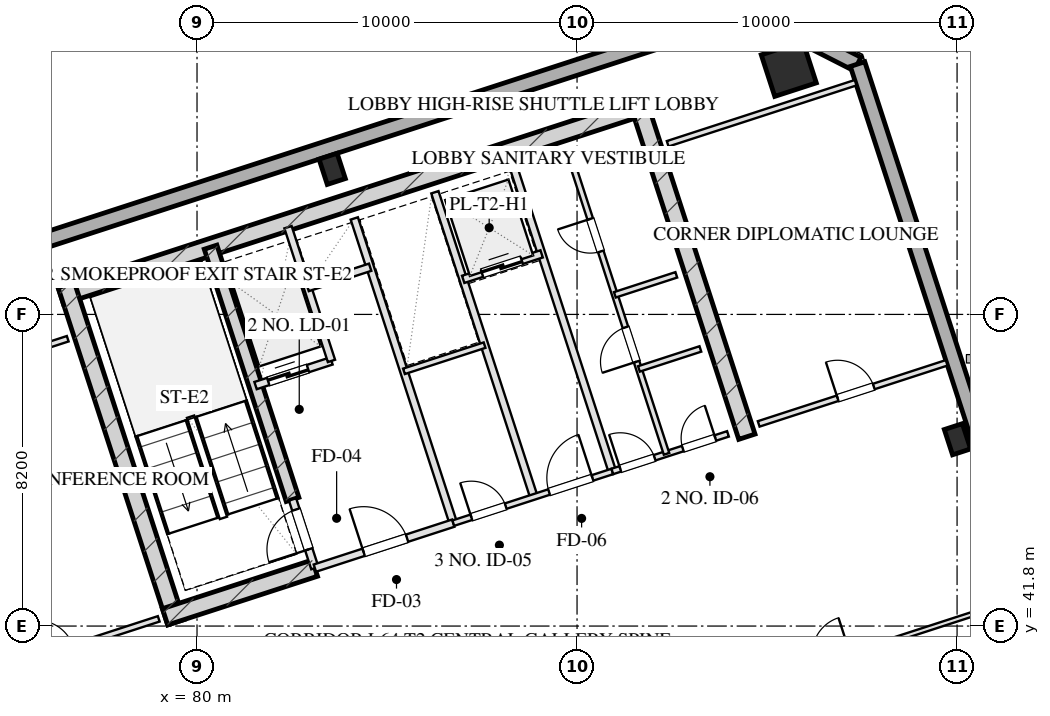
"""IFC4 building model, lengths in metres.
Left out: names, types, materials, properties, quantities, classifications, styles, units other than length and angle.
Written with IfcOpenShell. Run it as: python <this file> out.ifc"""

import sys

from ifc_helpers import new_model, si_unit, direction, frame, frame_2d, origin, origin_2d, place, context, subcontext, project, spatial, rectangle, hollow_rectangle, extrude, element, fill, save


model = new_model("IFC4")
c1 = context("Model", 3, precision=1e-05, world=origin(), true_north=direction((0.0, 1.0)))
c2 = subcontext(c1, "Body", "Model", "MODEL_VIEW")
j1 = project(units=[si_unit("LENGTHUNIT", "METRE"), si_unit("PLANEANGLEUNIT", "RADIAN")], contexts=[c1])
p1 = place(None, origin())
s1 = spatial("IfcSite", under=j1, at=p1, CompositionType="ELEMENT")
p2 = place(p1, origin())
s2 = spatial("IfcBuilding", under=s1, at=p2, CompositionType="ELEMENT")
p3 = place(p2, frame((0.0, 0.0, 237.6)))
s3 = spatial("IfcBuildingStorey", under=s2, at=p3, CompositionType="ELEMENT", Elevation=237.6)
p4 = place(p3, frame((76.415, 50.489, 0.0), z_axis=(0.0, 0.0, 1.0), x_axis=(0.951056810414, 0.309016089169, 0.0)))
e1 = element("IfcWall", 1, at=p4, inside=s3, PredefinedType="SHEAR", context=c2, shape_type="SweptSolid", body=[
    extrude(rectangle(XDim=16.25, YDim=0.45, at=frame_2d((8.125, 0.0))), origin(), (0.0, 0.0, 1.0), 3.2),
])
for number, where, z_axis, x_axis in (
    (2, (79.442, 41.899, 0.0), (0.0, 0.0, 1.0), (-0.309, 0.951, 0.0)),
    (3, (94.469, 46.781, 0.0), (0.0, 0.0, 1.0), (-0.309, 0.951, 0.0)),
):
    element("IfcWall", number, at=place(p3, frame(where, z_axis=z_axis, x_axis=x_axis)), inside=s3, PredefinedType="SHEAR", context=c2, shape_type="SweptSolid", body=[
        extrude(rectangle(XDim=9.33, YDim=0.45, at=frame_2d((4.665, 0.0))), origin(), (0.0, 0.0, 1.0), 3.2),
    ])
p5 = place(p3, frame((82.514, 45.131, 0.0), z_axis=(0.0, 0.0, 1.0), x_axis=(-0.308988790936, 0.951065679686, 0.0)))
e4 = element("IfcWall", 4, at=p5, inside=s3, PredefinedType="SHEAR", context=c2, shape_type="SweptSolid", body=[
    extrude(rectangle(XDim=6.98, YDim=0.35, at=frame_2d((3.49, 0.0))), origin(), (0.0, 0.0, 1.0), 3.2),
])
p6 = place(p3, frame((79.159, 42.043, 0.0), z_axis=(0.0, 0.0, 1.0), x_axis=(0.951047485828, 0.309044785913, 0.0)))
e5 = element("IfcWall", 5, at=p6, inside=s3, PredefinedType="SHEAR", context=c2, shape_type="SweptSolid", body=[
    extrude(rectangle(XDim=4.145, YDim=0.45, at=frame_2d((2.073, 0.0))), origin(), (0.0, 0.0, 1.0), 3.2),
])
p7 = place(p3, frame((95.572, 56.461, 0.0), z_axis=(0.0, 0.0, 1.0), x_axis=(0.951056516295, 0.309016994375, 0.0)))
e6 = element("IfcColumn", 6, at=p7, inside=s3, PredefinedType="COLUMN", context=c2, shape_type="SweptSolid", body=[
    extrude(hollow_rectangle(XDim=1.15, YDim=1.15, WallThickness=0.04, at=origin_2d()), origin(), (0.0, 0.0, 1.0), 3.201),
])
for number, where, z_axis, x_axis in (
    (7, (100.01, 46.716, 0.0), (0.0, 0.0, 1.0), (0.951, 0.309, 0.0)),
    (8, (83.557, 53.83, 0.0), (0.0, 0.0, 1.0), (0.951, 0.309, 0.0)),
):
    element("IfcColumn", number, at=place(p3, frame(where, z_axis=z_axis, x_axis=x_axis)), inside=s3, PredefinedType="COLUMN", context=c2, shape_type="SweptSolid", body=[
        extrude(hollow_rectangle(XDim=0.5, YDim=0.7, WallThickness=0.025, at=origin_2d()), origin(), (0.0, 0.0, 1.0), 3.201),
    ])
p8 = place(p3, frame((82.618, 11.414, 0.0), z_axis=(0.0, 0.0, 1.0), x_axis=(-0.309016491071, 0.951056679828, 0.0)))
e9 = element("IfcWall", 9, at=p8, inside=s3, PredefinedType="SOLIDWALL", context=c2, shape_type="SweptSolid", body=[
    extrude(rectangle(XDim=38.4, YDim=0.4, at=frame_2d((19.2, 0.0))), origin(), (0.0, 0.0, 1.0), 2.36),
])
p9 = place(p8, frame((20.825, 0.0, 0.75)))
e10 = element("IfcOpeningElement", 10, at=p9, cuts=e9, PredefinedType="OPENING", context=c2, shape_type="SweptSolid", body=[
    extrude(rectangle(XDim=1.95, YDim=1.21, at=frame_2d((0.975, 0.605))), frame((0.0, 0.21, 0.0), z_axis=(0.0, -1.0, 0.0), x_axis=(1.0, 0.0, 0.0)), (0.0, 0.0, 1.0), 0.42),
])
p10 = place(p8, frame((24.625, 0.0, 0.75)))
e11 = element("IfcOpeningElement", 11, at=p10, cuts=e9, PredefinedType="OPENING", context=c2, shape_type="SweptSolid", body=[
    extrude(rectangle(XDim=1.95, YDim=1.21, at=frame_2d((0.975, 0.605))), frame((0.0, 0.21, 0.0), z_axis=(0.0, -1.0, 0.0), x_axis=(1.0, 0.0, 0.0)), (0.0, 0.0, 1.0), 0.42),
])
p11 = place(p8, frame((15.8, 0.0, 0.0)))
e12 = element("IfcOpeningElement", 12, at=p11, cuts=e9, PredefinedType="OPENING", context=c2, shape_type="SweptSolid", body=[
    extrude(rectangle(XDim=1.1, YDim=2.15, at=frame_2d((0.55, 1.075))), frame((0.0, 0.21, 0.0), z_axis=(0.0, -1.0, 0.0), x_axis=(1.0, 0.0, 0.0)), (0.0, 0.0, 1.0), 0.42),
])
p12 = place(p3, frame((72.165, 50.706, 0.0), z_axis=(0.0, 0.0, 1.0), x_axis=(0.951058012937, 0.309012388148, 0.0)))
e13 = element("IfcWall", 13, at=p12, inside=s3, PredefinedType="SOLIDWALL", context=c2, shape_type="SweptSolid", body=[
    extrude(rectangle(XDim=23.6, YDim=0.4, at=frame_2d((11.8, 0.0))), origin(), (0.0, 0.0, 1.0), 2.36),
])
p13 = place(p3, frame((94.61, 57.999, 0.0), z_axis=(0.0, 0.0, 1.0), x_axis=(0.890979603174, -0.454043331334, 0.0)))
e14 = element("IfcWall", 14, at=p13, inside=s3, PredefinedType="SOLIDWALL", context=c2, shape_type="SweptSolid", body=[
    extrude(rectangle(XDim=3.111, YDim=0.4, at=frame_2d((1.556, 0.0))), origin(), (0.0, 0.0, 1.0), 2.36),
])
p14 = place(p3, frame((97.382, 56.586, 0.0), z_axis=(0.0, 0.0, 1.0), x_axis=(0.309016491071, -0.951056679828, 0.0)))
e15 = element("IfcWall", 15, at=p14, inside=s3, PredefinedType="SOLIDWALL", context=c2, shape_type="SweptSolid", body=[
    extrude(rectangle(XDim=38.4, YDim=0.4, at=frame_2d((19.2, 0.0))), origin(), (0.0, 0.0, 1.0), 2.36),
])
p15 = place(p14, frame((15.625, 0.0, 0.75)))
e16 = element("IfcOpeningElement", 16, at=p15, cuts=e15, PredefinedType="OPENING", context=c2, shape_type="SweptSolid", body=[
    extrude(rectangle(XDim=1.95, YDim=1.21, at=frame_2d((0.975, 0.605))), frame((0.0, 0.21, 0.0), z_axis=(0.0, -1.0, 0.0), x_axis=(1.0, 0.0, 0.0)), (0.0, 0.0, 1.0), 0.42),
])
p16 = place(p14, frame((11.825, 0.0, 0.75)))
e17 = element("IfcOpeningElement", 17, at=p16, cuts=e15, PredefinedType="OPENING", context=c2, shape_type="SweptSolid", body=[
    extrude(rectangle(XDim=1.95, YDim=1.21, at=frame_2d((0.975, 0.605))), frame((0.0, 0.21, 0.0), z_axis=(0.0, -1.0, 0.0), x_axis=(1.0, 0.0, 0.0)), (0.0, 0.0, 1.0), 0.42),
])
p17 = place(p14, frame((21.5, 0.0, 0.0)))
e18 = element("IfcOpeningElement", 18, at=p17, cuts=e15, PredefinedType="OPENING", context=c2, shape_type="SweptSolid", body=[
    extrude(rectangle(XDim=1.1, YDim=2.15, at=frame_2d((0.55, 1.075))), frame((0.0, 0.21, 0.0), z_axis=(0.0, -1.0, 0.0), x_axis=(1.0, 0.0, 0.0)), (0.0, 0.0, 1.0), 0.42),
])
p18 = place(p3, frame((83.101, 43.324, 0.0), z_axis=(0.0, 0.0, 1.0), x_axis=(-0.309048298632, 0.951046344356, 0.0)))
e19 = element("IfcWall", 19, at=p18, inside=s3, PredefinedType="PARTITIONING", context=c2, shape_type="SweptSolid", body=[
    extrude(rectangle(XDim=1.9, YDim=0.2, at=frame_2d((0.95, 0.0))), origin(), (0.0, 0.0, 1.0), 2.925),
])
p19 = place(p18, frame((0.52, 0.0, 0.0)))
e20 = element("IfcOpeningElement", 20, at=p19, cuts=e19, PredefinedType="OPENING", context=c2, shape_type="SweptSolid", body=[
    extrude(rectangle(XDim=1.1, YDim=2.05, at=frame_2d((0.55, 1.025))), frame((0.0, 0.11, 0.0), z_axis=(0.0, -1.0, 0.0), x_axis=(1.0, 0.0, 0.0)), (0.0, 0.0, 1.0), 0.22),
])
p20 = place(p3, frame((86.743, 44.508, 0.0), z_axis=(0.0, 0.0, 1.0), x_axis=(-0.309016001439, 0.951056838919, 0.0)))
e21 = element("IfcWall", 21, at=p20, inside=s3, PredefinedType="PARTITIONING", context=c2, shape_type="SweptSolid", body=[
    extrude(rectangle(XDim=8.43, YDim=0.2, at=frame_2d((4.215, 0.0))), origin(), (0.0, 0.0, 1.0), 2.925),
])
p21 = place(p3, frame((83.101, 43.324, 0.0), z_axis=(0.0, 0.0, 1.0), x_axis=(0.951052804469, 0.309028417967, 0.0)))
e22 = element("IfcWall", 22, at=p21, inside=s3, PredefinedType="PARTITIONING", context=c2, shape_type="SweptSolid", body=[
    extrude(rectangle(XDim=3.83, YDim=0.2, at=frame_2d((1.915, 0.0))), origin(), (0.0, 0.0, 1.0), 2.925),
])
p22 = place(p21, frame((1.35, 0.0, 0.0)))
e23 = element("IfcOpeningElement", 23, at=p22, cuts=e22, PredefinedType="OPENING", context=c2, shape_type="SweptSolid", body=[
    extrude(rectangle(XDim=1.2, YDim=2.05, at=frame_2d((0.6, 1.025))), frame((0.0, 0.11, 0.0), z_axis=(0.0, -1.0, 0.0), x_axis=(1.0, 0.0, 0.0)), (0.0, 0.0, 1.0), 0.22),
])
p23 = place(p3, frame((81.54, 48.127, 0.0), z_axis=(0.0, 0.0, 1.0), x_axis=(0.951062257173, 0.308999325213, 0.0)))
e24 = element("IfcWall", 24, at=p23, inside=s3, PredefinedType="PARTITIONING", context=c2, shape_type="SweptSolid", body=[
    extrude(rectangle(XDim=2.1, YDim=0.2, at=frame_2d((1.05, 0.0))), origin(), (0.0, 0.0, 1.0), 2.925),
])
p24 = place(p23, frame((0.35, 0.0, 0.0)))
e25 = element("IfcOpeningElement", 25, at=p24, cuts=e24, PredefinedType="OPENING", context=c2, shape_type="SweptSolid", body=[
    extrude(rectangle(XDim=1.1, YDim=2.05, at=frame_2d((0.55, 1.025))), frame((0.0, 0.11, 0.0), z_axis=(0.0, -1.0, 0.0), x_axis=(1.0, 0.0, 0.0)), (0.0, 0.0, 1.0), 0.22),
])
p25 = place(p3, frame((83.538, 48.776, 0.0), z_axis=(0.0, 0.0, 1.0), x_axis=(-0.3089935693, 0.951064127245, 0.0)))
e26 = element("IfcWall", 26, at=p25, inside=s3, PredefinedType="PARTITIONING", context=c2, shape_type="SweptSolid", body=[
    extrude(rectangle(XDim=3.7, YDim=0.2, at=frame_2d((1.85, 0.0))), origin(), (0.0, 0.0, 1.0), 2.925),
])
p26 = place(p3, frame((82.91, 50.707, 0.0), z_axis=(0.0, 0.0, 1.0), x_axis=(0.951041328149, 0.309063734775, 0.0)))
e27 = element("IfcWall", 27, at=p26, inside=s3, PredefinedType="PARTITIONING", context=c2, shape_type="SweptSolid", body=[
    extrude(rectangle(XDim=1.73, YDim=0.2, at=frame_2d((0.865, 0.0))), origin(), (0.0, 0.0, 1.0), 2.925),
])
p27 = place(p3, frame((90.928, 45.868, 0.0), z_axis=(0.0, 0.0, 1.0), x_axis=(-0.309042196757, 0.951048327176, 0.0)))
e28 = element("IfcWall", 28, at=p27, inside=s3, PredefinedType="PARTITIONING", context=c2, shape_type="SweptSolid", body=[
    extrude(rectangle(XDim=8.43, YDim=0.2, at=frame_2d((4.215, 0.0))), origin(), (0.0, 0.0, 1.0), 2.925),
])
p28 = place(p3, frame((88.864, 45.197, 0.0), z_axis=(0.0, 0.0, 1.0), x_axis=(-0.309007490203, 0.951059604335, 0.0)))
e29 = element("IfcWall", 29, at=p28, inside=s3, PredefinedType="PARTITIONING", context=c2, shape_type="SweptSolid", body=[
    extrude(rectangle(XDim=8.43, YDim=0.2, at=frame_2d((4.215, 0.0))), origin(), (0.0, 0.0, 1.0), 2.925),
])
p29 = place(p3, frame((86.743, 44.508, 0.0), z_axis=(0.0, 0.0, 1.0), x_axis=(0.951063829732, 0.308994485023, 0.0)))
e30 = element("IfcWall", 30, at=p29, inside=s3, PredefinedType="PARTITIONING", context=c2, shape_type="SweptSolid", body=[
    extrude(rectangle(XDim=4.4, YDim=0.15, at=frame_2d((2.2, 0.0))), origin(), (0.0, 0.0, 1.0), 2.925),
])
p30 = place(p29, frame((0.5, 0.0, 0.0)))
e31 = element("IfcOpeningElement", 31, at=p30, cuts=e30, PredefinedType="OPENING", context=c2, shape_type="SweptSolid", body=[
    extrude(rectangle(XDim=0.95, YDim=2.05, at=frame_2d((0.475, 1.025))), frame((0.0, 0.085, 0.0), z_axis=(0.0, -1.0, 0.0), x_axis=(1.0, 0.0, 0.0)), (0.0, 0.0, 1.0), 0.17),
])
p31 = place(p29, frame((2.65, 0.0, 0.0)))
e32 = element("IfcOpeningElement", 32, at=p31, cuts=e30, PredefinedType="OPENING", context=c2, shape_type="SweptSolid", body=[
    extrude(rectangle(XDim=1.2, YDim=2.05, at=frame_2d((0.6, 1.025))), frame((0.0, 0.085, 0.0), z_axis=(0.0, -1.0, 0.0), x_axis=(1.0, 0.0, 0.0)), (0.0, 0.0, 1.0), 0.17),
])
p32 = place(p3, frame((85.446, 48.502, 0.0), z_axis=(0.0, 0.0, 1.0), x_axis=(0.951075093106, 0.308959814982, 0.0)))
e33 = element("IfcWall", 33, at=p32, inside=s3, PredefinedType="PARTITIONING", context=c2, shape_type="SweptSolid", body=[
    extrude(rectangle(XDim=2.23, YDim=0.15, at=frame_2d((1.115, 0.0))), origin(), (0.0, 0.0, 1.0), 2.925),
])
p33 = place(p3, frame((87.004, 50.922, 0.0), z_axis=(0.0, 0.0, 1.0), x_axis=(0.951041509718, 0.309063176055, 0.0)))
e34 = element("IfcWall", 34, at=p33, inside=s3, PredefinedType="PARTITIONING", context=c2, shape_type="SweptSolid", body=[
    extrude(rectangle(XDim=2.17, YDim=0.2, at=frame_2d((1.085, 0.0))), origin(), (0.0, 0.0, 1.0), 2.925),
])
p34 = place(p33, frame((0.52, 0.0, 0.0)))
e35 = element("IfcOpeningElement", 35, at=p34, cuts=e34, PredefinedType="OPENING", context=c2, shape_type="SweptSolid", body=[
    extrude(rectangle(XDim=1.1, YDim=2.05, at=frame_2d((0.55, 1.025))), frame((0.0, 0.11, 0.0), z_axis=(0.0, -1.0, 0.0), x_axis=(1.0, 0.0, 0.0)), (0.0, 0.0, 1.0), 0.22),
])
p35 = place(p3, frame((90.928, 45.868, 0.0), z_axis=(0.0, 0.0, 1.0), x_axis=(0.951059297078, 0.309008435874, 0.0)))
e36 = element("IfcWall", 36, at=p35, inside=s3, PredefinedType="PARTITIONING", context=c2, shape_type="SweptSolid", body=[
    extrude(rectangle(XDim=3.2, YDim=0.15, at=frame_2d((1.6, 0.0))), origin(), (0.0, 0.0, 1.0), 2.925),
])
p36 = place(p35, frame((0.22, 0.0, 0.0)))
e37 = element("IfcOpeningElement", 37, at=p36, cuts=e36, PredefinedType="OPENING", context=c2, shape_type="SweptSolid", body=[
    extrude(rectangle(XDim=0.95, YDim=2.05, at=frame_2d((0.475, 1.025))), frame((0.0, 0.085, 0.0), z_axis=(0.0, -1.0, 0.0), x_axis=(1.0, 0.0, 0.0)), (0.0, 0.0, 1.0), 0.17),
])
p37 = place(p35, frame((1.95, 0.0, 0.0)))
e38 = element("IfcOpeningElement", 38, at=p37, cuts=e36, PredefinedType="OPENING", context=c2, shape_type="SweptSolid", body=[
    extrude(rectangle(XDim=0.9, YDim=2.05, at=frame_2d((0.45, 1.025))), frame((0.0, 0.085, 0.0), z_axis=(0.0, -1.0, 0.0), x_axis=(1.0, 0.0, 0.0)), (0.0, 0.0, 1.0), 0.17),
])
p38 = place(p3, frame((92.355, 46.331, 0.0), z_axis=(0.0, 0.0, 1.0), x_axis=(-0.309007490203, 0.951059604335, 0.0)))
e39 = element("IfcWall", 39, at=p38, inside=s3, PredefinedType="PARTITIONING", context=c2, shape_type="SweptSolid", body=[
    extrude(rectangle(XDim=8.43, YDim=0.15, at=frame_2d((4.215, 0.0))), origin(), (0.0, 0.0, 1.0), 2.925),
])
p39 = place(p38, frame((2.55, 0.0, 0.0)))
e40 = element("IfcOpeningElement", 40, at=p39, cuts=e39, PredefinedType="OPENING", context=c2, shape_type="SweptSolid", body=[
    extrude(rectangle(XDim=0.95, YDim=2.05, at=frame_2d((0.475, 1.025))), frame((0.0, 0.085, 0.0), z_axis=(0.0, -1.0, 0.0), x_axis=(1.0, 0.0, 0.0)), (0.0, 0.0, 1.0), 0.17),
])
p40 = place(p38, frame((5.6, 0.0, 0.0)))
e41 = element("IfcOpeningElement", 41, at=p40, cuts=e39, PredefinedType="OPENING", context=c2, shape_type="SweptSolid", body=[
    extrude(rectangle(XDim=0.9, YDim=2.05, at=frame_2d((0.45, 1.025))), frame((0.0, 0.085, 0.0), z_axis=(0.0, -1.0, 0.0), x_axis=(1.0, 0.0, 0.0)), (0.0, 0.0, 1.0), 0.17),
])
p41 = place(p3, frame((90.995, 50.516, 0.0), z_axis=(0.0, 0.0, 1.0), x_axis=(0.951040401051, 0.309066587596, 0.0)))
e42 = element("IfcWall", 42, at=p41, inside=s3, PredefinedType="PARTITIONING", context=c2, shape_type="SweptSolid", body=[
    extrude(rectangle(XDim=1.7, YDim=0.15, at=frame_2d((0.85, 0.0))), origin(), (0.0, 0.0, 1.0), 2.925),
])
p42 = place(p3, frame((91.628, 48.566, 0.0), z_axis=(0.0, 0.0, 1.0), x_axis=(0.951054116971, 0.309024378638, 0.0)))
e43 = element("IfcWall", 43, at=p42, inside=s3, PredefinedType="PARTITIONING", context=c2, shape_type="SweptSolid", body=[
    extrude(rectangle(XDim=1.7, YDim=0.15, at=frame_2d((0.85, 0.0))), origin(), (0.0, 0.0, 1.0), 2.925),
])
p43 = place(p3, frame((71.081, 47.568, 0.0), z_axis=(0.0, 0.0, 1.0), x_axis=(0.951059431056, 0.309008023519, 0.0)))
e44 = element("IfcWall", 44, at=p43, inside=s3, PredefinedType="PARTITIONING", context=c2, shape_type="SweptSolid", body=[
    extrude(rectangle(XDim=5.8, YDim=0.15, at=frame_2d((2.9, 0.0))), origin(), (0.0, 0.0, 1.0), 2.925),
])
p44 = place(p3, frame((73.476, 40.197, 0.0), z_axis=(0.0, 0.0, 1.0), x_axis=(0.951059431056, 0.309008023519, 0.0)))
e45 = element("IfcWall", 45, at=p44, inside=s3, PredefinedType="PARTITIONING", context=c2, shape_type="SweptSolid", body=[
    extrude(rectangle(XDim=5.8, YDim=0.15, at=frame_2d((2.9, 0.0))), origin(), (0.0, 0.0, 1.0), 2.925),
])
p45 = place(p44, frame((2.436, 0.0, 0.0)))
e46 = element("IfcOpeningElement", 46, at=p45, cuts=e45, PredefinedType="OPENING", context=c2, shape_type="SweptSolid", body=[
    extrude(rectangle(XDim=1.0, YDim=2.05, at=frame_2d((0.5, 1.025))), frame((0.0, 0.085, 0.0), z_axis=(0.0, -1.0, 0.0), x_axis=(1.0, 0.0, 0.0)), (0.0, 0.0, 1.0), 0.17),
])
p46 = place(p3, frame((92.385, 54.49, 0.0), z_axis=(0.0, 0.0, 1.0), x_axis=(0.951055112834, 0.309021313752, 0.0)))
e47 = element("IfcWall", 47, at=p46, inside=s3, PredefinedType="PARTITIONING", context=c2, shape_type="SweptSolid", body=[
    extrude(rectangle(XDim=5.2, YDim=0.15, at=frame_2d((2.6, 0.0))), origin(), (0.0, 0.0, 1.0), 2.925),
])
p47 = place(p3, frame((94.78, 47.119, 0.0), z_axis=(0.0, 0.0, 1.0), x_axis=(0.951055112834, 0.309021313752, 0.0)))
e48 = element("IfcWall", 48, at=p47, inside=s3, PredefinedType="PARTITIONING", context=c2, shape_type="SweptSolid", body=[
    extrude(rectangle(XDim=5.2, YDim=0.15, at=frame_2d((2.6, 0.0))), origin(), (0.0, 0.0, 1.0), 2.925),
])
p48 = place(p47, frame((2.184, 0.0, 0.0)))
e49 = element("IfcOpeningElement", 49, at=p48, cuts=e48, PredefinedType="OPENING", context=c2, shape_type="SweptSolid", body=[
    extrude(rectangle(XDim=1.0, YDim=2.05, at=frame_2d((0.5, 1.025))), frame((0.0, 0.085, 0.0), z_axis=(0.0, -1.0, 0.0), x_axis=(1.0, 0.0, 0.0)), (0.0, 0.0, 1.0), 0.17),
])
p49 = place(p3, frame((87.825, 38.025, 0.0), z_axis=(0.0, 0.0, 1.0), x_axis=(0.951058110432, 0.309012088082, 0.0)))
e50 = element("IfcWall", 50, at=p49, inside=s3, PredefinedType="PARTITIONING", context=c2, shape_type="SweptSolid", body=[
    extrude(rectangle(XDim=14.625, YDim=0.12, at=frame_2d((7.312, 0.0))), origin(), (0.0, 0.0, 1.0), 2.925),
])
p50 = place(p49, frame((8.845, 0.0, 0.0)))
e51 = element("IfcOpeningElement", 51, at=p50, cuts=e50, PredefinedType="OPENING", context=c2, shape_type="SweptSolid", body=[
    extrude(rectangle(XDim=1.0, YDim=2.05, at=frame_2d((0.5, 1.025))), frame((0.0, 0.07, 0.0), z_axis=(0.0, -1.0, 0.0), x_axis=(1.0, 0.0, 0.0)), (0.0, 0.0, 1.0), 0.14),
])
p51 = place(p19, origin())
e52 = element("IfcDoor", 52, at=p51, inside=s3, OperationType="SINGLE_SWING_LEFT", PredefinedType="DOOR", context=c2, shape_type="SweptSolid", body=[
    extrude(rectangle(XDim=1.1, YDim=2.05, at=frame_2d((0.55, 1.025))), frame((0.0, 0.025, 0.0), z_axis=(0.0, -1.0, 0.0), x_axis=(1.0, 0.0, 0.0)), (0.0, 0.0, 1.0), 0.05),
])
fill(e20, e52)
p52 = place(p22, origin())
e53 = element("IfcDoor", 53, at=p52, inside=s3, OperationType="SINGLE_SWING_LEFT", PredefinedType="DOOR", context=c2, shape_type="SweptSolid", body=[
    extrude(rectangle(XDim=1.2, YDim=2.05, at=frame_2d((0.6, 1.025))), frame((0.0, 0.025, 0.0), z_axis=(0.0, -1.0, 0.0), x_axis=(1.0, 0.0, 0.0)), (0.0, 0.0, 1.0), 0.05),
])
fill(e23, e53)
p53 = place(p24, origin())
e54 = element("IfcDoor", 54, at=p53, inside=s3, OperationType="DOUBLE_DOOR_SLIDING", PredefinedType="DOOR", context=c2, shape_type="SweptSolid", body=[
    extrude(rectangle(XDim=1.1, YDim=2.05, at=frame_2d((0.55, 1.025))), frame((0.0, 0.025, 0.0), z_axis=(0.0, -1.0, 0.0), x_axis=(1.0, 0.0, 0.0)), (0.0, 0.0, 1.0), 0.05),
])
fill(e25, e54)
p54 = place(p30, origin())
e55 = element("IfcDoor", 55, at=p54, inside=s3, OperationType="SINGLE_SWING_LEFT", PredefinedType="DOOR", context=c2, shape_type="SweptSolid", body=[
    extrude(rectangle(XDim=0.95, YDim=2.05, at=frame_2d((0.475, 1.025))), frame((0.0, 0.025, 0.0), z_axis=(0.0, -1.0, 0.0), x_axis=(1.0, 0.0, 0.0)), (0.0, 0.0, 1.0), 0.05),
])
fill(e31, e55)
p55 = place(p31, origin())
e56 = element("IfcDoor", 56, at=p55, inside=s3, OperationType="SINGLE_SWING_RIGHT", PredefinedType="DOOR", context=c2, shape_type="SweptSolid", body=[
    extrude(rectangle(XDim=1.2, YDim=2.05, at=frame_2d((0.6, 1.025))), frame((0.0, 0.025, 0.0), z_axis=(0.0, -1.0, 0.0), x_axis=(1.0, 0.0, 0.0)), (0.0, 0.0, 1.0), 0.05),
])
fill(e32, e56)
p56 = place(p34, origin())
e57 = element("IfcDoor", 57, at=p56, inside=s3, OperationType="DOUBLE_DOOR_SLIDING", PredefinedType="DOOR", context=c2, shape_type="SweptSolid", body=[
    extrude(rectangle(XDim=1.1, YDim=2.05, at=frame_2d((0.55, 1.025))), frame((0.0, 0.025, 0.0), z_axis=(0.0, -1.0, 0.0), x_axis=(1.0, 0.0, 0.0)), (0.0, 0.0, 1.0), 0.05),
])
fill(e35, e57)
p57 = place(p36, origin())
e58 = element("IfcDoor", 58, at=p57, inside=s3, OperationType="SINGLE_SWING_LEFT", PredefinedType="DOOR", context=c2, shape_type="SweptSolid", body=[
    extrude(rectangle(XDim=0.95, YDim=2.05, at=frame_2d((0.475, 1.025))), frame((0.0, 0.025, 0.0), z_axis=(0.0, -1.0, 0.0), x_axis=(1.0, 0.0, 0.0)), (0.0, 0.0, 1.0), 0.05),
])
fill(e37, e58)
p58 = place(p37, origin())
e59 = element("IfcDoor", 59, at=p58, inside=s3, OperationType="SINGLE_SWING_RIGHT", PredefinedType="DOOR", context=c2, shape_type="SweptSolid", body=[
    extrude(rectangle(XDim=0.9, YDim=2.05, at=frame_2d((0.45, 1.025))), frame((0.0, 0.025, 0.0), z_axis=(0.0, -1.0, 0.0), x_axis=(1.0, 0.0, 0.0)), (0.0, 0.0, 1.0), 0.05),
])
fill(e38, e59)
p59 = place(p39, origin())
e60 = element("IfcDoor", 60, at=p59, inside=s3, OperationType="SINGLE_SWING_LEFT", PredefinedType="DOOR", context=c2, shape_type="SweptSolid", body=[
    extrude(rectangle(XDim=0.95, YDim=2.05, at=frame_2d((0.475, 1.025))), frame((0.0, 0.025, 0.0), z_axis=(0.0, -1.0, 0.0), x_axis=(1.0, 0.0, 0.0)), (0.0, 0.0, 1.0), 0.05),
])
fill(e40, e60)
p60 = place(p40, origin())
e61 = element("IfcDoor", 61, at=p60, inside=s3, OperationType="SINGLE_SWING_RIGHT", PredefinedType="DOOR", context=c2, shape_type="SweptSolid", body=[
    extrude(rectangle(XDim=0.9, YDim=2.05, at=frame_2d((0.45, 1.025))), frame((0.0, 0.025, 0.0), z_axis=(0.0, -1.0, 0.0), x_axis=(1.0, 0.0, 0.0)), (0.0, 0.0, 1.0), 0.05),
])
fill(e41, e61)
p61 = place(p48, origin())
e62 = element("IfcDoor", 62, at=p61, inside=s3, OperationType="SINGLE_SWING_LEFT", PredefinedType="DOOR", context=c2, shape_type="SweptSolid", body=[
    extrude(rectangle(XDim=1.0, YDim=2.05, at=frame_2d((0.5, 1.025))), frame((0.0, 0.025, 0.0), z_axis=(0.0, -1.0, 0.0), x_axis=(1.0, 0.0, 0.0)), (0.0, 0.0, 1.0), 0.05),
])
fill(e49, e62)
save(model, sys.argv[1])
